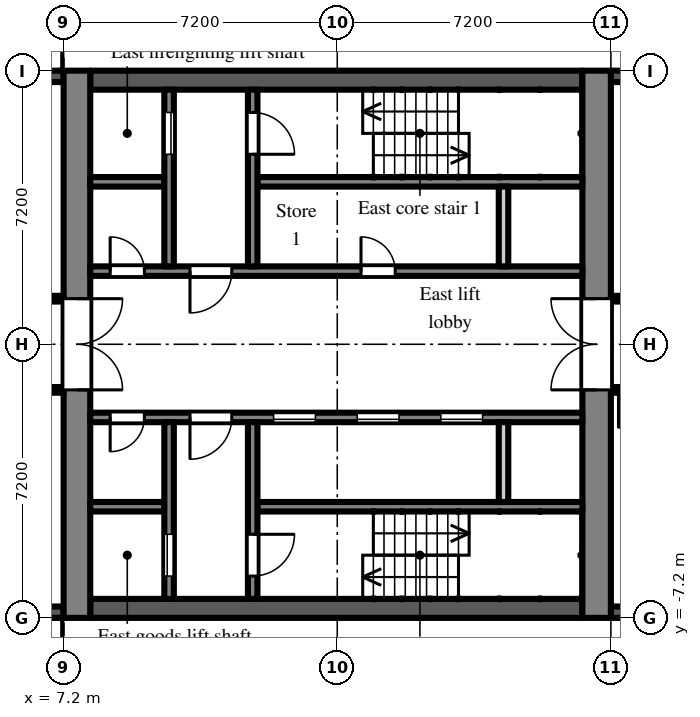
"""IFC4 building model, lengths in metres.
Left out: names, types, materials, properties, quantities, classifications, styles, units other than length and angle.
Written with IfcOpenShell. Run it as: python <this file> out.ifc"""

import sys

from ifc_helpers import new_model, si_unit, direction, frame, frame_2d, origin, place, context, subcontext, project, spatial, rectangle, extrude, element, fill, save


model = new_model("IFC4")
c1 = context("Model", 3, precision=1e-05, world=origin(), true_north=direction((0.0, 1.0)))
c2 = subcontext(c1, "Body", "Model", "MODEL_VIEW")
j1 = project(units=[si_unit("LENGTHUNIT", "METRE"), si_unit("PLANEANGLEUNIT", "RADIAN")], contexts=[c1])
p1 = place(None, origin())
s1 = spatial("IfcSite", under=j1, at=p1, CompositionType="ELEMENT")
p2 = place(p1, origin())
s2 = spatial("IfcBuilding", under=s1, at=p2, CompositionType="ELEMENT")
p3 = place(p2, frame((0.0, 0.0, 69.9)))
s3 = spatial("IfcBuildingStorey", under=s2, at=p3, CompositionType="ELEMENT", Elevation=69.9)
p4 = place(p3, frame((21.6, -7.05, 0.0), z_axis=(0.0, 0.0, 1.0), x_axis=(1.0, 0.0, 0.0)))
e1 = element("IfcWall", 1, at=p4, inside=s3, PredefinedType="SOLIDWALL", context=c2, shape_type="SweptSolid", body=[
    extrude(rectangle(XDim=2.7, YDim=0.3, at=frame_2d((1.35, 0.0))), origin(), (0.0, 0.0, 1.0), 2.1),
])
p5 = place(p4, frame((0.75, 0.0, 0.2)))
e2 = element("IfcOpeningElement", 2, at=p5, cuts=e1, PredefinedType="OPENING", context=c2, shape_type="SweptSolid", body=[
    extrude(rectangle(XDim=1.2, YDim=1.85, at=frame_2d((0.6, 0.925))), frame((0.0, 0.16, 0.0), z_axis=(0.0, -1.0, 0.0), x_axis=(1.0, 0.0, 0.0)), (0.0, 0.0, 1.0), 0.32),
])
p6 = place(p3, frame((24.3, 7.05, 0.0), z_axis=(0.0, 0.0, 1.0), x_axis=(-1.0, 0.0, 0.0)))
e3 = element("IfcWall", 3, at=p6, inside=s3, PredefinedType="SOLIDWALL", context=c2, shape_type="SweptSolid", body=[
    extrude(rectangle(XDim=2.7, YDim=0.3, at=frame_2d((1.35, 0.0))), origin(), (0.0, 0.0, 1.0), 2.1),
])
p7 = place(p6, frame((0.75, 0.0, 0.2)))
e4 = element("IfcOpeningElement", 4, at=p7, cuts=e3, PredefinedType="OPENING", context=c2, shape_type="SweptSolid", body=[
    extrude(rectangle(XDim=1.2, YDim=1.85, at=frame_2d((0.6, 0.925))), frame((0.0, 0.16, 0.0), z_axis=(0.0, -1.0, 0.0), x_axis=(1.0, 0.0, 0.0)), (0.0, 0.0, 1.0), 0.32),
])
for number, where, z_axis, x_axis in (
    (5, (7.2, 7.05, 0.0), (0.0, 0.0, 1.0), (-1.0, 0.0, 0.0)),
    (6, (4.2, -7.05, 0.0), (0.0, 0.0, 1.0), (1.0, 0.0, 0.0)),
):
    element("IfcWall", number, at=place(p3, frame(where, z_axis=z_axis, x_axis=x_axis)), inside=s3, PredefinedType="SOLIDWALL", context=c2, shape_type="SweptSolid", body=[
        extrude(rectangle(XDim=3.0, YDim=0.3, at=frame_2d((1.5, 0.0))), origin(), (0.0, 0.0, 1.0), 2.1),
    ])
p8 = place(p3, frame((7.55, -7.2, 0.0), z_axis=(0.0, 0.0, 1.0), x_axis=(0.0, 1.0, 0.0)))
e7 = element("IfcWall", 7, at=p8, inside=s3, PredefinedType="SHEAR", context=c2, shape_type="SweptSolid", body=[
    extrude(rectangle(XDim=14.4, YDim=0.7, at=frame_2d((7.2, 0.0))), origin(), (0.0, 0.0, 1.0), 2.575),
])
p9 = place(p8, frame((6.0, 0.0, 0.0)))
e8 = element("IfcOpeningElement", 8, at=p9, cuts=e7, PredefinedType="OPENING", context=c2, shape_type="SweptSolid", body=[
    extrude(rectangle(XDim=2.4, YDim=2.2, at=frame_2d((1.2, 1.1))), frame((0.0, 0.36, 0.0), z_axis=(0.0, -1.0, 0.0), x_axis=(1.0, 0.0, 0.0)), (0.0, 0.0, 1.0), 0.72),
])
p10 = place(p3, frame((21.225, -7.2, 0.0), z_axis=(0.0, 0.0, 1.0), x_axis=(0.0, 1.0, 0.0)))
e9 = element("IfcWall", 9, at=p10, inside=s3, PredefinedType="SHEAR", context=c2, shape_type="SweptSolid", body=[
    extrude(rectangle(XDim=14.4, YDim=0.75, at=frame_2d((7.2, 0.0))), origin(), (0.0, 0.0, 1.0), 2.575),
])
p11 = place(p10, frame((6.0, 0.0, 0.0)))
e10 = element("IfcOpeningElement", 10, at=p11, cuts=e9, PredefinedType="OPENING", context=c2, shape_type="SweptSolid", body=[
    extrude(rectangle(XDim=2.4, YDim=2.2, at=frame_2d((1.2, 1.1))), frame((0.0, 0.385, 0.0), z_axis=(0.0, -1.0, 0.0), x_axis=(1.0, 0.0, 0.0)), (0.0, 0.0, 1.0), 0.77),
])
p12 = place(p3, frame((7.9, 6.95, 0.0), z_axis=(0.0, 0.0, 1.0), x_axis=(1.0, 0.0, 0.0)))
e11 = element("IfcWall", 11, at=p12, inside=s3, PredefinedType="SHEAR", context=c2, shape_type="SweptSolid", body=[
    extrude(rectangle(XDim=12.95, YDim=0.5, at=frame_2d((6.475, 0.0))), origin(), (0.0, 0.0, 1.0), 2.575),
])
p13 = place(p3, frame((7.9, 1.925, 0.0), z_axis=(0.0, 0.0, 1.0), x_axis=(1.0, 0.0, 0.0)))
e12 = element("IfcWall", 12, at=p13, inside=s3, PredefinedType="SHEAR", context=c2, shape_type="SweptSolid", body=[
    extrude(rectangle(XDim=12.95, YDim=0.25, at=frame_2d((6.475, 0.0))), origin(), (0.0, 0.0, 1.0), 2.575),
])
p14 = place(p13, frame((0.525, 0.0, 0.0)))
e13 = element("IfcOpeningElement", 13, at=p14, cuts=e12, PredefinedType="OPENING", context=c2, shape_type="SweptSolid", body=[
    extrude(rectangle(XDim=0.9, YDim=2.1, at=frame_2d((0.45, 1.05))), frame((0.0, 0.135, 0.0), z_axis=(0.0, -1.0, 0.0), x_axis=(1.0, 0.0, 0.0)), (0.0, 0.0, 1.0), 0.27),
])
p15 = place(p13, frame((2.625, 0.0, 0.0)))
e14 = element("IfcOpeningElement", 14, at=p15, cuts=e12, PredefinedType="OPENING", context=c2, shape_type="SweptSolid", body=[
    extrude(rectangle(XDim=1.1, YDim=2.1, at=frame_2d((0.55, 1.05))), frame((0.0, 0.135, 0.0), z_axis=(0.0, -1.0, 0.0), x_axis=(1.0, 0.0, 0.0)), (0.0, 0.0, 1.0), 0.27),
])
p16 = place(p13, frame((7.125, 0.0, 0.0)))
e15 = element("IfcOpeningElement", 15, at=p16, cuts=e12, PredefinedType="OPENING", context=c2, shape_type="SweptSolid", body=[
    extrude(rectangle(XDim=0.9, YDim=2.1, at=frame_2d((0.45, 1.05))), frame((0.0, 0.135, 0.0), z_axis=(0.0, -1.0, 0.0), x_axis=(1.0, 0.0, 0.0)), (0.0, 0.0, 1.0), 0.27),
])
p17 = place(p3, frame((7.9, 4.275, 0.0), z_axis=(0.0, 0.0, 1.0), x_axis=(1.0, 0.0, 0.0)))
e16 = element("IfcWall", 16, at=p17, inside=s3, PredefinedType="SHEAR", context=c2, shape_type="SweptSolid", body=[
    extrude(rectangle(XDim=1.95, YDim=0.25, at=frame_2d((0.975, 0.0))), origin(), (0.0, 0.0, 1.0), 2.575),
])
p18 = place(p3, frame((12.3, 4.275, 0.0), z_axis=(0.0, 0.0, 1.0), x_axis=(1.0, 0.0, 0.0)))
e17 = element("IfcWall", 17, at=p18, inside=s3, PredefinedType="SHEAR", context=c2, shape_type="SweptSolid", body=[
    extrude(rectangle(XDim=8.55, YDim=0.25, at=frame_2d((4.275, 0.0))), origin(), (0.0, 0.0, 1.0), 2.575),
])
p19 = place(p3, frame((9.975, 2.05, 0.0), z_axis=(0.0, 0.0, 1.0), x_axis=(0.0, 1.0, 0.0)))
e18 = element("IfcWall", 18, at=p19, inside=s3, PredefinedType="SHEAR", context=c2, shape_type="SweptSolid", body=[
    extrude(rectangle(XDim=4.65, YDim=0.25, at=frame_2d((2.325, 0.0))), origin(), (0.0, 0.0, 1.0), 2.575),
])
p20 = place(p19, frame((2.95, 0.0, 0.0)))
e19 = element("IfcOpeningElement", 19, at=p20, cuts=e18, PredefinedType="OPENING", context=c2, shape_type="SweptSolid", body=[
    extrude(rectangle(XDim=1.1, YDim=2.1, at=frame_2d((0.55, 1.05))), frame((0.0, 0.135, 0.0), z_axis=(0.0, -1.0, 0.0), x_axis=(1.0, 0.0, 0.0)), (0.0, 0.0, 1.0), 0.27),
])
p21 = place(p3, frame((12.175, 2.05, 0.0), z_axis=(0.0, 0.0, 1.0), x_axis=(0.0, 1.0, 0.0)))
e20 = element("IfcWall", 20, at=p21, inside=s3, PredefinedType="SHEAR", context=c2, shape_type="SweptSolid", body=[
    extrude(rectangle(XDim=4.65, YDim=0.25, at=frame_2d((2.325, 0.0))), origin(), (0.0, 0.0, 1.0), 2.575),
])
p22 = place(p21, frame((2.95, 0.0, 0.0)))
e21 = element("IfcOpeningElement", 21, at=p22, cuts=e20, PredefinedType="OPENING", context=c2, shape_type="SweptSolid", body=[
    extrude(rectangle(XDim=1.1, YDim=2.1, at=frame_2d((0.55, 1.05))), frame((0.0, 0.135, 0.0), z_axis=(0.0, -1.0, 0.0), x_axis=(1.0, 0.0, 0.0)), (0.0, 0.0, 1.0), 0.27),
])
p23 = place(p3, frame((18.775, 2.05, 0.0), z_axis=(0.0, 0.0, 1.0), x_axis=(0.0, 1.0, 0.0)))
e22 = element("IfcWall", 22, at=p23, inside=s3, PredefinedType="PARTITIONING", context=c2, shape_type="SweptSolid", body=[
    extrude(rectangle(XDim=2.1, YDim=0.25, at=frame_2d((1.05, 0.0))), origin(), (0.0, 0.0, 1.0), 2.575),
])
p24 = place(p3, frame((7.9, -6.95, 0.0), z_axis=(0.0, 0.0, 1.0), x_axis=(1.0, 0.0, 0.0)))
e23 = element("IfcWall", 23, at=p24, inside=s3, PredefinedType="SHEAR", context=c2, shape_type="SweptSolid", body=[
    extrude(rectangle(XDim=12.95, YDim=0.5, at=frame_2d((6.475, 0.0))), origin(), (0.0, 0.0, 1.0), 2.575),
])
p25 = place(p3, frame((7.9, -1.925, 0.0), z_axis=(0.0, 0.0, 1.0), x_axis=(1.0, 0.0, 0.0)))
e24 = element("IfcWall", 24, at=p25, inside=s3, PredefinedType="SHEAR", context=c2, shape_type="SweptSolid", body=[
    extrude(rectangle(XDim=12.95, YDim=0.25, at=frame_2d((6.475, 0.0))), origin(), (0.0, 0.0, 1.0), 2.575),
])
p26 = place(p25, frame((4.825, 0.0, 0.0)))
e25 = element("IfcOpeningElement", 25, at=p26, cuts=e24, PredefinedType="OPENING", context=c2, shape_type="SweptSolid", body=[
    extrude(rectangle(XDim=1.1, YDim=2.1, at=frame_2d((0.55, 1.05))), frame((0.0, 0.135, 0.0), z_axis=(0.0, -1.0, 0.0), x_axis=(1.0, 0.0, 0.0)), (0.0, 0.0, 1.0), 0.27),
])
p27 = place(p25, frame((7.025, 0.0, 0.0)))
e26 = element("IfcOpeningElement", 26, at=p27, cuts=e24, PredefinedType="OPENING", context=c2, shape_type="SweptSolid", body=[
    extrude(rectangle(XDim=1.1, YDim=2.1, at=frame_2d((0.55, 1.05))), frame((0.0, 0.135, 0.0), z_axis=(0.0, -1.0, 0.0), x_axis=(1.0, 0.0, 0.0)), (0.0, 0.0, 1.0), 0.27),
])
p28 = place(p25, frame((9.225, 0.0, 0.0)))
e27 = element("IfcOpeningElement", 27, at=p28, cuts=e24, PredefinedType="OPENING", context=c2, shape_type="SweptSolid", body=[
    extrude(rectangle(XDim=1.1, YDim=2.1, at=frame_2d((0.55, 1.05))), frame((0.0, 0.135, 0.0), z_axis=(0.0, -1.0, 0.0), x_axis=(1.0, 0.0, 0.0)), (0.0, 0.0, 1.0), 0.27),
])
p29 = place(p25, frame((0.525, 0.0, 0.0)))
e28 = element("IfcOpeningElement", 28, at=p29, cuts=e24, PredefinedType="OPENING", context=c2, shape_type="SweptSolid", body=[
    extrude(rectangle(XDim=0.9, YDim=2.1, at=frame_2d((0.45, 1.05))), frame((0.0, 0.135, 0.0), z_axis=(0.0, -1.0, 0.0), x_axis=(1.0, 0.0, 0.0)), (0.0, 0.0, 1.0), 0.27),
])
p30 = place(p25, frame((2.625, 0.0, 0.0)))
e29 = element("IfcOpeningElement", 29, at=p30, cuts=e24, PredefinedType="OPENING", context=c2, shape_type="SweptSolid", body=[
    extrude(rectangle(XDim=1.1, YDim=2.1, at=frame_2d((0.55, 1.05))), frame((0.0, 0.135, 0.0), z_axis=(0.0, -1.0, 0.0), x_axis=(1.0, 0.0, 0.0)), (0.0, 0.0, 1.0), 0.27),
])
p31 = place(p3, frame((7.9, -4.275, 0.0), z_axis=(0.0, 0.0, 1.0), x_axis=(1.0, 0.0, 0.0)))
e30 = element("IfcWall", 30, at=p31, inside=s3, PredefinedType="SHEAR", context=c2, shape_type="SweptSolid", body=[
    extrude(rectangle(XDim=1.95, YDim=0.25, at=frame_2d((0.975, 0.0))), origin(), (0.0, 0.0, 1.0), 2.575),
])
p32 = place(p3, frame((12.3, -4.275, 0.0), z_axis=(0.0, 0.0, 1.0), x_axis=(1.0, 0.0, 0.0)))
e31 = element("IfcWall", 31, at=p32, inside=s3, PredefinedType="SHEAR", context=c2, shape_type="SweptSolid", body=[
    extrude(rectangle(XDim=8.55, YDim=0.25, at=frame_2d((4.275, 0.0))), origin(), (0.0, 0.0, 1.0), 2.575),
])
p33 = place(p3, frame((9.975, -2.05, 0.0), z_axis=(0.0, 0.0, 1.0), x_axis=(0.0, -1.0, 0.0)))
e32 = element("IfcWall", 32, at=p33, inside=s3, PredefinedType="SHEAR", context=c2, shape_type="SweptSolid", body=[
    extrude(rectangle(XDim=4.65, YDim=0.25, at=frame_2d((2.325, 0.0))), origin(), (0.0, 0.0, 1.0), 2.575),
])
p34 = place(p33, frame((2.95, 0.0, 0.0)))
e33 = element("IfcOpeningElement", 33, at=p34, cuts=e32, PredefinedType="OPENING", context=c2, shape_type="SweptSolid", body=[
    extrude(rectangle(XDim=1.1, YDim=2.1, at=frame_2d((0.55, 1.05))), frame((0.0, 0.135, 0.0), z_axis=(0.0, -1.0, 0.0), x_axis=(1.0, 0.0, 0.0)), (0.0, 0.0, 1.0), 0.27),
])
p35 = place(p3, frame((12.175, -2.05, 0.0), z_axis=(0.0, 0.0, 1.0), x_axis=(0.0, -1.0, 0.0)))
e34 = element("IfcWall", 34, at=p35, inside=s3, PredefinedType="SHEAR", context=c2, shape_type="SweptSolid", body=[
    extrude(rectangle(XDim=4.65, YDim=0.25, at=frame_2d((2.325, 0.0))), origin(), (0.0, 0.0, 1.0), 2.575),
])
p36 = place(p35, frame((2.95, 0.0, 0.0)))
e35 = element("IfcOpeningElement", 35, at=p36, cuts=e34, PredefinedType="OPENING", context=c2, shape_type="SweptSolid", body=[
    extrude(rectangle(XDim=1.1, YDim=2.1, at=frame_2d((0.55, 1.05))), frame((0.0, 0.135, 0.0), z_axis=(0.0, -1.0, 0.0), x_axis=(1.0, 0.0, 0.0)), (0.0, 0.0, 1.0), 0.27),
])
p37 = place(p3, frame((18.775, -2.05, 0.0), z_axis=(0.0, 0.0, 1.0), x_axis=(0.0, -1.0, 0.0)))
e36 = element("IfcWall", 36, at=p37, inside=s3, PredefinedType="PARTITIONING", context=c2, shape_type="SweptSolid", body=[
    extrude(rectangle(XDim=2.1, YDim=0.25, at=frame_2d((1.05, 0.0))), origin(), (0.0, 0.0, 1.0), 2.575),
])
p38 = place(p3, frame((1.275, -1.2, 0.0), z_axis=(0.0, 0.0, 1.0), x_axis=(1.0, 0.0, 0.0)))
e37 = element("IfcWall", 37, at=p38, inside=s3, PredefinedType="PARTITIONING", context=c2, shape_type="SweptSolid", body=[
    extrude(rectangle(XDim=5.925, YDim=0.15, at=frame_2d((2.962, 0.0))), origin(), (0.0, 0.0, 1.0), 2.575),
])
p39 = place(p38, frame((4.475, 0.0, 0.0)))
e38 = element("IfcOpeningElement", 38, at=p39, cuts=e37, PredefinedType="OPENING", context=c2, shape_type="SweptSolid", body=[
    extrude(rectangle(XDim=0.9, YDim=2.1, at=frame_2d((0.45, 1.05))), frame((0.0, 0.085, 0.0), z_axis=(0.0, -1.0, 0.0), x_axis=(1.0, 0.0, 0.0)), (0.0, 0.0, 1.0), 0.17),
])
p40 = place(p3, frame((1.275, 1.2, 0.0), z_axis=(0.0, 0.0, 1.0), x_axis=(1.0, 0.0, 0.0)))
e39 = element("IfcWall", 39, at=p40, inside=s3, PredefinedType="PARTITIONING", context=c2, shape_type="SweptSolid", body=[
    extrude(rectangle(XDim=5.925, YDim=0.15, at=frame_2d((2.962, 0.0))), origin(), (0.0, 0.0, 1.0), 2.575),
])
p41 = place(p40, frame((2.475, 0.0, 0.0)))
e40 = element("IfcOpeningElement", 40, at=p41, cuts=e39, PredefinedType="OPENING", context=c2, shape_type="SweptSolid", body=[
    extrude(rectangle(XDim=0.9, YDim=2.1, at=frame_2d((0.45, 1.05))), frame((0.0, 0.085, 0.0), z_axis=(0.0, -1.0, 0.0), x_axis=(1.0, 0.0, 0.0)), (0.0, 0.0, 1.0), 0.17),
])
p42 = place(p3, frame((21.6, -1.2, 0.0), z_axis=(0.0, 0.0, 1.0), x_axis=(1.0, 0.0, 0.0)))
e41 = element("IfcWall", 41, at=p42, inside=s3, PredefinedType="PARTITIONING", context=c2, shape_type="SweptSolid", body=[
    extrude(rectangle(XDim=14.9, YDim=0.15, at=frame_2d((7.45, 0.0))), origin(), (0.0, 0.0, 1.0), 2.575),
])
p43 = place(p42, frame((0.2, 0.0, 0.0)))
e42 = element("IfcOpeningElement", 42, at=p43, cuts=e41, PredefinedType="OPENING", context=c2, shape_type="SweptSolid", body=[
    extrude(rectangle(XDim=1.0, YDim=2.1, at=frame_2d((0.5, 1.05))), frame((0.0, 0.085, 0.0), z_axis=(0.0, -1.0, 0.0), x_axis=(1.0, 0.0, 0.0)), (0.0, 0.0, 1.0), 0.17),
])
p44 = place(p42, frame((5.71, 0.0, 0.0)))
e43 = element("IfcOpeningElement", 43, at=p44, cuts=e41, PredefinedType="OPENING", context=c2, shape_type="SweptSolid", body=[
    extrude(rectangle(XDim=1.0, YDim=2.1, at=frame_2d((0.5, 1.05))), frame((0.0, 0.085, 0.0), z_axis=(0.0, -1.0, 0.0), x_axis=(1.0, 0.0, 0.0)), (0.0, 0.0, 1.0), 0.17),
])
p45 = place(p42, frame((11.95, 0.0, 0.0)))
e44 = element("IfcOpeningElement", 44, at=p45, cuts=e41, PredefinedType="OPENING", context=c2, shape_type="SweptSolid", body=[
    extrude(rectangle(XDim=1.8, YDim=2.1, at=frame_2d((0.9, 1.05))), frame((0.0, 0.085, 0.0), z_axis=(0.0, -1.0, 0.0), x_axis=(1.0, 0.0, 0.0)), (0.0, 0.0, 1.0), 0.17),
])
p46 = place(p3, frame((21.6, 1.2, 0.0), z_axis=(0.0, 0.0, 1.0), x_axis=(1.0, 0.0, 0.0)))
e45 = element("IfcWall", 45, at=p46, inside=s3, PredefinedType="PARTITIONING", context=c2, shape_type="SweptSolid", body=[
    extrude(rectangle(XDim=14.9, YDim=0.15, at=frame_2d((7.45, 0.0))), origin(), (0.0, 0.0, 1.0), 2.575),
])
p47 = place(p46, frame((1.35, 0.0, 0.0)))
e46 = element("IfcOpeningElement", 46, at=p47, cuts=e45, PredefinedType="OPENING", context=c2, shape_type="SweptSolid", body=[
    extrude(rectangle(XDim=0.9, YDim=2.1, at=frame_2d((0.45, 1.05))), frame((0.0, 0.085, 0.0), z_axis=(0.0, -1.0, 0.0), x_axis=(1.0, 0.0, 0.0)), (0.0, 0.0, 1.0), 0.17),
])
p48 = place(p46, frame((6.3, 0.0, 0.0)))
e47 = element("IfcOpeningElement", 47, at=p48, cuts=e45, PredefinedType="OPENING", context=c2, shape_type="SweptSolid", body=[
    extrude(rectangle(XDim=1.8, YDim=2.1, at=frame_2d((0.9, 1.05))), frame((0.0, 0.085, 0.0), z_axis=(0.0, -1.0, 0.0), x_axis=(1.0, 0.0, 0.0)), (0.0, 0.0, 1.0), 0.17),
])
p49 = place(p46, frame((11.95, 0.0, 0.0)))
e48 = element("IfcOpeningElement", 48, at=p49, cuts=e45, PredefinedType="OPENING", context=c2, shape_type="SweptSolid", body=[
    extrude(rectangle(XDim=1.8, YDim=2.1, at=frame_2d((0.9, 1.05))), frame((0.0, 0.085, 0.0), z_axis=(0.0, -1.0, 0.0), x_axis=(1.0, 0.0, 0.0)), (0.0, 0.0, 1.0), 0.17),
])
p50 = place(p26, origin())
e49 = element("IfcDoor", 49, at=p50, inside=s3, OperationType="SLIDING_TO_LEFT", PredefinedType="DOOR", context=c2, shape_type="SweptSolid", body=[
    extrude(rectangle(XDim=1.1, YDim=2.1, at=frame_2d((0.55, 1.05))), frame((0.0, 0.025, 0.0), z_axis=(0.0, -1.0, 0.0), x_axis=(1.0, 0.0, 0.0)), (0.0, 0.0, 1.0), 0.05),
])
fill(e25, e49)
p51 = place(p27, origin())
e50 = element("IfcDoor", 50, at=p51, inside=s3, OperationType="SLIDING_TO_LEFT", PredefinedType="DOOR", context=c2, shape_type="SweptSolid", body=[
    extrude(rectangle(XDim=1.1, YDim=2.1, at=frame_2d((0.55, 1.05))), frame((0.0, 0.025, 0.0), z_axis=(0.0, -1.0, 0.0), x_axis=(1.0, 0.0, 0.0)), (0.0, 0.0, 1.0), 0.05),
])
fill(e26, e50)
p52 = place(p28, origin())
e51 = element("IfcDoor", 51, at=p52, inside=s3, OperationType="SLIDING_TO_LEFT", PredefinedType="DOOR", context=c2, shape_type="SweptSolid", body=[
    extrude(rectangle(XDim=1.1, YDim=2.1, at=frame_2d((0.55, 1.05))), frame((0.0, 0.025, 0.0), z_axis=(0.0, -1.0, 0.0), x_axis=(1.0, 0.0, 0.0)), (0.0, 0.0, 1.0), 0.05),
])
fill(e27, e51)
p53 = place(p20, origin())
e52 = element("IfcDoor", 52, at=p53, inside=s3, OperationType="SLIDING_TO_LEFT", PredefinedType="DOOR", context=c2, shape_type="SweptSolid", body=[
    extrude(rectangle(XDim=1.1, YDim=2.1, at=frame_2d((0.55, 1.05))), frame((0.0, 0.025, 0.0), z_axis=(0.0, -1.0, 0.0), x_axis=(1.0, 0.0, 0.0)), (0.0, 0.0, 1.0), 0.05),
])
fill(e19, e52)
p54 = place(p34, origin())
e53 = element("IfcDoor", 53, at=p54, inside=s3, OperationType="SLIDING_TO_LEFT", PredefinedType="DOOR", context=c2, shape_type="SweptSolid", body=[
    extrude(rectangle(XDim=1.1, YDim=2.1, at=frame_2d((0.55, 1.05))), frame((0.0, 0.025, 0.0), z_axis=(0.0, -1.0, 0.0), x_axis=(1.0, 0.0, 0.0)), (0.0, 0.0, 1.0), 0.05),
])
fill(e33, e53)
p55 = place(p22, frame((1.1, 0.0, 0.0), z_axis=(0.0, 0.0, 1.0), x_axis=(-1.0, 0.0, 0.0)))
e54 = element("IfcDoor", 54, at=p55, inside=s3, OperationType="SINGLE_SWING_RIGHT", PredefinedType="DOOR", context=c2, shape_type="SweptSolid", body=[
    extrude(rectangle(XDim=1.1, YDim=2.1, at=frame_2d((0.55, 1.05))), frame((0.0, 0.025, 0.0), z_axis=(0.0, -1.0, 0.0), x_axis=(1.0, 0.0, 0.0)), (0.0, 0.0, 1.0), 0.05),
])
fill(e21, e54)
p56 = place(p36, origin())
e55 = element("IfcDoor", 55, at=p56, inside=s3, OperationType="SINGLE_SWING_LEFT", PredefinedType="DOOR", context=c2, shape_type="SweptSolid", body=[
    extrude(rectangle(XDim=1.1, YDim=2.1, at=frame_2d((0.55, 1.05))), frame((0.0, 0.025, 0.0), z_axis=(0.0, -1.0, 0.0), x_axis=(1.0, 0.0, 0.0)), (0.0, 0.0, 1.0), 0.05),
])
fill(e35, e55)
p57 = place(p14, origin())
e56 = element("IfcDoor", 56, at=p57, inside=s3, OperationType="SINGLE_SWING_LEFT", PredefinedType="DOOR", context=c2, shape_type="SweptSolid", body=[
    extrude(rectangle(XDim=0.9, YDim=2.1, at=frame_2d((0.45, 1.05))), frame((0.0, 0.025, 0.0), z_axis=(0.0, -1.0, 0.0), x_axis=(1.0, 0.0, 0.0)), (0.0, 0.0, 1.0), 0.05),
])
fill(e13, e56)
p58 = place(p29, frame((0.9, 0.0, 0.0), z_axis=(0.0, 0.0, 1.0), x_axis=(-1.0, 0.0, 0.0)))
e57 = element("IfcDoor", 57, at=p58, inside=s3, OperationType="SINGLE_SWING_RIGHT", PredefinedType="DOOR", context=c2, shape_type="SweptSolid", body=[
    extrude(rectangle(XDim=0.9, YDim=2.1, at=frame_2d((0.45, 1.05))), frame((0.0, 0.025, 0.0), z_axis=(0.0, -1.0, 0.0), x_axis=(1.0, 0.0, 0.0)), (0.0, 0.0, 1.0), 0.05),
])
fill(e28, e57)
p59 = place(p15, frame((1.1, 0.0, 0.0), z_axis=(0.0, 0.0, 1.0), x_axis=(-1.0, 0.0, 0.0)))
e58 = element("IfcDoor", 58, at=p59, inside=s3, OperationType="SINGLE_SWING_RIGHT", PredefinedType="DOOR", context=c2, shape_type="SweptSolid", body=[
    extrude(rectangle(XDim=1.1, YDim=2.1, at=frame_2d((0.55, 1.05))), frame((0.0, 0.025, 0.0), z_axis=(0.0, -1.0, 0.0), x_axis=(1.0, 0.0, 0.0)), (0.0, 0.0, 1.0), 0.05),
])
fill(e14, e58)
p60 = place(p30, frame((1.1, 0.0, 0.0), z_axis=(0.0, 0.0, 1.0), x_axis=(-1.0, 0.0, 0.0)))
e59 = element("IfcDoor", 59, at=p60, inside=s3, OperationType="SINGLE_SWING_RIGHT", PredefinedType="DOOR", context=c2, shape_type="SweptSolid", body=[
    extrude(rectangle(XDim=1.1, YDim=2.1, at=frame_2d((0.55, 1.05))), frame((0.0, 0.025, 0.0), z_axis=(0.0, -1.0, 0.0), x_axis=(1.0, 0.0, 0.0)), (0.0, 0.0, 1.0), 0.05),
])
fill(e29, e59)
p61 = place(p9, frame((2.4, 0.0, 0.0), z_axis=(0.0, 0.0, 1.0), x_axis=(-1.0, 0.0, 0.0)))
e60 = element("IfcDoor", 60, at=p61, inside=s3, OperationType="DOUBLE_DOOR_DOUBLE_SWING", PredefinedType="DOOR", context=c2, shape_type="SweptSolid", body=[
    extrude(rectangle(XDim=2.4, YDim=2.2, at=frame_2d((1.2, 1.1))), frame((0.0, 0.025, 0.0), z_axis=(0.0, -1.0, 0.0), x_axis=(1.0, 0.0, 0.0)), (0.0, 0.0, 1.0), 0.05),
])
fill(e8, e60)
p62 = place(p11, origin())
e61 = element("IfcDoor", 61, at=p62, inside=s3, OperationType="DOUBLE_DOOR_DOUBLE_SWING", PredefinedType="DOOR", context=c2, shape_type="SweptSolid", body=[
    extrude(rectangle(XDim=2.4, YDim=2.2, at=frame_2d((1.2, 1.1))), frame((0.0, 0.025, 0.0), z_axis=(0.0, -1.0, 0.0), x_axis=(1.0, 0.0, 0.0)), (0.0, 0.0, 1.0), 0.05),
])
fill(e10, e61)
p63 = place(p16, origin())
e62 = element("IfcDoor", 62, at=p63, inside=s3, OperationType="SINGLE_SWING_LEFT", PredefinedType="DOOR", context=c2, shape_type="SweptSolid", body=[
    extrude(rectangle(XDim=0.9, YDim=2.1, at=frame_2d((0.45, 1.05))), frame((0.0, 0.025, 0.0), z_axis=(0.0, -1.0, 0.0), x_axis=(1.0, 0.0, 0.0)), (0.0, 0.0, 1.0), 0.05),
])
fill(e15, e62)
p64 = place(p43, frame((1.0, 0.0, 0.0), z_axis=(0.0, 0.0, 1.0), x_axis=(-1.0, 0.0, 0.0)))
e63 = element("IfcDoor", 63, at=p64, inside=s3, OperationType="SINGLE_SWING_RIGHT", PredefinedType="DOOR", context=c2, shape_type="SweptSolid", body=[
    extrude(rectangle(XDim=1.0, YDim=2.1, at=frame_2d((0.5, 1.05))), frame((0.0, 0.025, 0.0), z_axis=(0.0, -1.0, 0.0), x_axis=(1.0, 0.0, 0.0)), (0.0, 0.0, 1.0), 0.05),
])
fill(e42, e63)
save(model, sys.argv[1])
